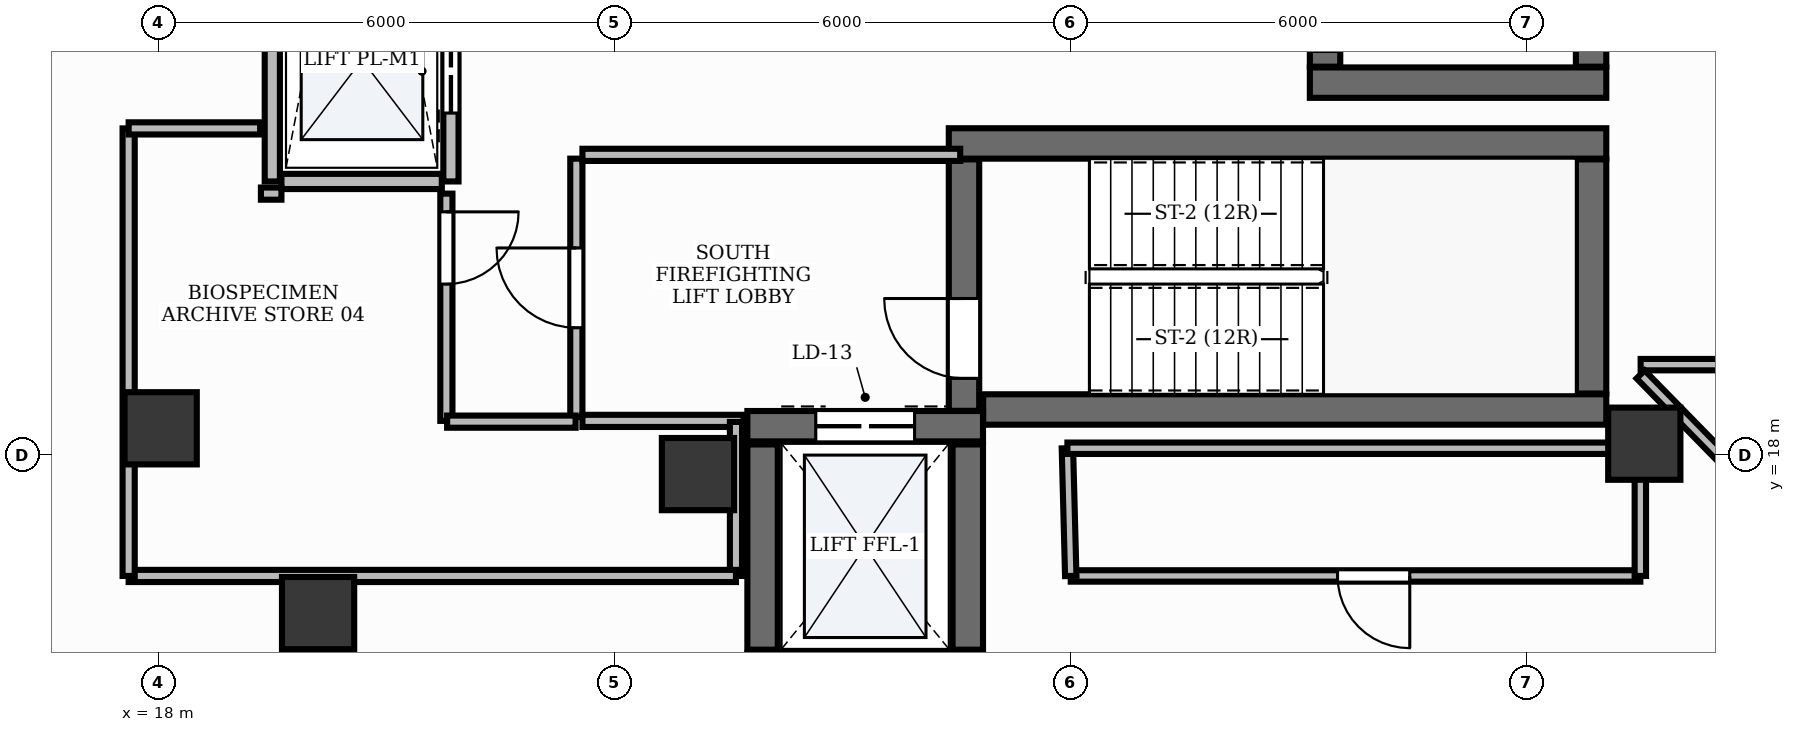
"""IFC4 building model, lengths in metres.
Left out: names, types, materials, properties, quantities, classifications, styles, units other than length and angle.
Written with IfcOpenShell. Run it as: python <this file> out.ifc"""

import sys

from ifc_helpers import new_model, si_unit, direction, frame, frame_2d, origin, origin_2d, place, context, subcontext, project, spatial, rectangle, extrude, element, fill, save


model = new_model("IFC4")
c1 = context("Model", 3, precision=1e-05, world=origin(), true_north=direction((0.0, 1.0)))
c2 = subcontext(c1, "Body", "Model", "MODEL_VIEW")
j1 = project(units=[si_unit("LENGTHUNIT", "METRE"), si_unit("PLANEANGLEUNIT", "RADIAN")], contexts=[c1])
p1 = place(None, origin())
s1 = spatial("IfcSite", under=j1, at=p1, CompositionType="ELEMENT")
p2 = place(p1, origin())
s2 = spatial("IfcBuilding", under=s1, at=p2, CompositionType="ELEMENT")
p3 = place(p2, frame((0.0, 0.0, 256.2)))
s3 = spatial("IfcBuildingStorey", under=s2, at=p3, CompositionType="ELEMENT", Elevation=256.2)
p4 = place(p3, frame((28.852, 18.6, 0.0), z_axis=(0.0, 0.0, 1.0), x_axis=(1.0, 0.0, 0.0)))
e1 = element("IfcWall", 1, at=p4, inside=s3, PredefinedType="SHEAR", context=c2, shape_type="SweptSolid", body=[
    extrude(rectangle(XDim=8.198, YDim=0.4, at=frame_2d((4.099, 0.0))), origin(), (0.0, 0.0, 1.0), 3.9),
])
p5 = place(p3, frame((28.4, 22.1, 0.0), z_axis=(0.0, 0.0, 1.0), x_axis=(1.0, 0.0, 0.0)))
e2 = element("IfcWall", 2, at=p5, inside=s3, PredefinedType="SHEAR", context=c2, shape_type="SweptSolid", body=[
    extrude(rectangle(XDim=8.65, YDim=0.4, at=frame_2d((4.325, 0.0))), origin(), (0.0, 0.0, 1.0), 3.9),
])
p6 = place(p3, frame((36.85, 18.81, 0.0), z_axis=(0.0, 0.0, 1.0), x_axis=(0.0, 1.0, 0.0)))
e3 = element("IfcWall", 3, at=p6, inside=s3, PredefinedType="SHEAR", context=c2, shape_type="SweptSolid", body=[
    extrude(rectangle(XDim=3.08, YDim=0.4, at=frame_2d((1.54, 0.0))), origin(), (0.0, 0.0, 1.0), 3.9),
])
p7 = place(p3, frame((28.6, 18.582, 0.0), z_axis=(0.0, 0.0, 1.0), x_axis=(0.0, 1.0, 0.0)))
e4 = element("IfcWall", 4, at=p7, inside=s3, PredefinedType="SHEAR", context=c2, shape_type="SweptSolid", body=[
    extrude(rectangle(XDim=3.308, YDim=0.4, at=frame_2d((1.654, 0.0))), origin(), (0.0, 0.0, 1.0), 3.9),
])
p8 = place(p7, frame((0.428, 0.0, 0.0)))
e5 = element("IfcOpeningElement", 5, at=p8, cuts=e4, PredefinedType="OPENING", context=c2, shape_type="SweptSolid", body=[
    extrude(rectangle(XDim=1.05, YDim=2.15, at=frame_2d((0.525, 1.075))), frame((0.0, 0.215, 0.0), z_axis=(0.0, -1.0, 0.0), x_axis=(1.0, 0.0, 0.0)), (0.0, 0.0, 1.0), 0.43),
])
p9 = place(p3, frame((33.15, 22.9, 0.0), z_axis=(0.0, 0.0, 1.0), x_axis=(1.0, 0.0, 0.0)))
e6 = element("IfcWall", 6, at=p9, inside=s3, PredefinedType="SHEAR", context=c2, shape_type="SweptSolid", body=[
    extrude(rectangle(XDim=3.9, YDim=0.4, at=frame_2d((1.95, 0.0))), origin(), (0.0, 0.0, 1.0), 3.9),
])
p10 = place(p3, frame((36.85, 23.11, 0.0), z_axis=(0.0, 0.0, 1.0), x_axis=(0.0, 1.0, 0.0)))
e7 = element("IfcWall", 7, at=p10, inside=s3, PredefinedType="SHEAR", context=c2, shape_type="SweptSolid", body=[
    extrude(rectangle(XDim=7.78, YDim=0.4, at=frame_2d((3.89, 0.0))), origin(), (0.0, 0.0, 1.0), 3.9),
])
p11 = place(p3, frame((33.35, 23.11, 0.0), z_axis=(0.0, 0.0, 1.0), x_axis=(0.0, 1.0, 0.0)))
e8 = element("IfcWall", 8, at=p11, inside=s3, PredefinedType="SHEAR", context=c2, shape_type="SweptSolid", body=[
    extrude(rectangle(XDim=7.78, YDim=0.4, at=frame_2d((3.89, 0.0))), origin(), (0.0, 0.0, 1.0), 3.9),
])
p12 = place(p11, frame((0.2, 0.0, 0.0)))
e9 = element("IfcOpeningElement", 9, at=p12, cuts=e8, PredefinedType="OPENING", context=c2, shape_type="SweptSolid", body=[
    extrude(rectangle(XDim=1.05, YDim=2.15, at=frame_2d((0.525, 1.075))), frame((0.0, 0.215, 0.0), z_axis=(0.0, -1.0, 0.0), x_axis=(1.0, 0.0, 0.0)), (0.0, 0.0, 1.0), 0.43),
])
p13 = place(p3, frame((25.75, 18.38, 0.0), z_axis=(0.0, 0.0, 1.0), x_axis=(1.0, 0.0, 0.0)))
e10 = element("IfcWall", 10, at=p13, inside=s3, PredefinedType="SHEAR", context=c2, shape_type="SweptSolid", body=[
    extrude(rectangle(XDim=3.1, YDim=0.4, at=frame_2d((1.55, 0.0))), origin(), (0.0, 0.0, 1.0), 3.9),
])
p14 = place(p13, frame((0.9, 0.0, 0.0)))
e11 = element("IfcOpeningElement", 11, at=p14, cuts=e10, PredefinedType="OPENING", context=c2, shape_type="SweptSolid", body=[
    extrude(rectangle(XDim=1.3, YDim=2.2, at=frame_2d((0.65, 1.1))), frame((0.0, 0.215, 0.0), z_axis=(0.0, -1.0, 0.0), x_axis=(1.0, 0.0, 0.0)), (0.0, 0.0, 1.0), 0.43),
])
for number, where, z_axis, x_axis in (
    (12, (25.95, 15.44, 0.0), (0.0, 0.0, 1.0), (0.0, 1.0, 0.0)),
    (13, (28.65, 15.44, 0.0), (0.0, 0.0, 1.0), (0.0, 1.0, 0.0)),
):
    element("IfcWall", number, at=place(p3, frame(where, z_axis=z_axis, x_axis=x_axis)), inside=s3, PredefinedType="SHEAR", context=c2, shape_type="SweptSolid", body=[
        extrude(rectangle(XDim=2.7, YDim=0.4, at=frame_2d((1.35, 0.0))), origin(), (0.0, 0.0, 1.0), 3.9),
    ])
for number, where, z_axis, x_axis in (
    (14, (25.1, 17.75, -0.0), (0.0, 0.0, 1.0), (1.0, 0.0, 0.0)),
    (15, (37.55, 18.15, -0.0), (0.0, 0.0, 1.0), (1.0, 0.0, 0.0)),
):
    element("IfcColumn", number, at=place(p3, frame(where, z_axis=z_axis, x_axis=x_axis)), inside=s3, PredefinedType="PILASTER", context=c2, shape_type="SweptSolid", body=[
        extrude(rectangle(XDim=0.95, YDim=0.95, at=origin_2d()), origin(), (0.0, 0.0, 1.0), 3.901),
    ])
for number, where, z_axis, x_axis in (
    (16, (18.031, 18.353, -0.0), (0.0, 0.0, 1.0), (1.0, 0.0, 0.0)),
    (17, (20.102, 15.921, -0.0), (0.0, 0.0, 1.0), (1.0, 0.0, 0.0)),
):
    element("IfcColumn", number, at=place(p3, frame(where, z_axis=z_axis, x_axis=x_axis)), inside=s3, PredefinedType="COLUMN", context=c2, shape_type="SweptSolid", body=[
        extrude(rectangle(XDim=0.95, YDim=0.95, at=origin_2d()), origin(), (0.0, 0.0, 1.0), 3.901),
    ])
p15 = place(p3, frame((19.5, 21.6, 0.0), z_axis=(0.0, 0.0, 1.0), x_axis=(0.0, 1.0, 0.0)))
e18 = element("IfcWall", 18, at=p15, inside=s3, PredefinedType="PARTITIONING", context=c2, shape_type="SweptSolid", body=[
    extrude(rectangle(XDim=10.8, YDim=0.2, at=frame_2d((5.4, 0.0))), origin(), (0.0, 0.0, 1.0), 2.22),
])
p16 = place(p3, frame((21.85, 21.6, 0.0), z_axis=(0.0, 0.0, 1.0), x_axis=(0.0, 1.0, 0.0)))
e19 = element("IfcWall", 19, at=p16, inside=s3, PredefinedType="PARTITIONING", context=c2, shape_type="SweptSolid", body=[
    extrude(rectangle(XDim=10.8, YDim=0.2, at=frame_2d((5.4, 0.0))), origin(), (0.0, 0.0, 1.0), 2.22),
])
p17 = place(p16, frame((0.9, 0.0, 0.0)))
e20 = element("IfcOpeningElement", 20, at=p17, cuts=e19, PredefinedType="OPENING", context=c2, shape_type="SweptSolid", body=[
    extrude(rectangle(XDim=1.1, YDim=2.2, at=frame_2d((0.55, 1.1))), frame((0.0, 0.115, 0.0), z_axis=(0.0, -1.0, 0.0), x_axis=(1.0, 0.0, 0.0)), (0.0, 0.0, 1.0), 0.23),
])
p18 = place(p16, frame((3.6, 0.0, 0.0)))
e21 = element("IfcOpeningElement", 21, at=p18, cuts=e19, PredefinedType="OPENING", context=c2, shape_type="SweptSolid", body=[
    extrude(rectangle(XDim=1.1, YDim=2.2, at=frame_2d((0.55, 1.1))), frame((0.0, 0.115, 0.0), z_axis=(0.0, -1.0, 0.0), x_axis=(1.0, 0.0, 0.0)), (0.0, 0.0, 1.0), 0.23),
])
p19 = place(p16, frame((6.3, 0.0, 0.0)))
e22 = element("IfcOpeningElement", 22, at=p19, cuts=e19, PredefinedType="OPENING", context=c2, shape_type="SweptSolid", body=[
    extrude(rectangle(XDim=1.1, YDim=2.2, at=frame_2d((0.55, 1.1))), frame((0.0, 0.115, 0.0), z_axis=(0.0, -1.0, 0.0), x_axis=(1.0, 0.0, 0.0)), (0.0, 0.0, 1.0), 0.23),
])
p20 = place(p16, frame((9.0, 0.0, 0.0)))
e23 = element("IfcOpeningElement", 23, at=p20, cuts=e19, PredefinedType="OPENING", context=c2, shape_type="SweptSolid", body=[
    extrude(rectangle(XDim=1.1, YDim=2.2, at=frame_2d((0.55, 1.1))), frame((0.0, 0.115, 0.0), z_axis=(0.0, -1.0, 0.0), x_axis=(1.0, 0.0, 0.0)), (0.0, 0.0, 1.0), 0.23),
])
p21 = place(p3, frame((19.62, 21.6, 0.0), z_axis=(0.0, 0.0, 1.0), x_axis=(1.0, 0.0, 0.0)))
e24 = element("IfcWall", 24, at=p21, inside=s3, PredefinedType="PARTITIONING", context=c2, shape_type="SweptSolid", body=[
    extrude(rectangle(XDim=2.11, YDim=0.2, at=frame_2d((1.055, 0.0))), origin(), (0.0, 0.0, 1.0), 2.22),
])
p22 = place(p3, frame((23.5, 18.5, 0.0), z_axis=(0.0, 0.0, 1.0), x_axis=(0.0, 1.0, 0.0)))
e25 = element("IfcWall", 25, at=p22, inside=s3, PredefinedType="PARTITIONING", context=c2, shape_type="SweptSolid", body=[
    extrude(rectangle(XDim=3.4, YDim=0.16, at=frame_2d((1.7, 0.0))), origin(), (0.0, 0.0, 1.0), 2.22),
])
p23 = place(p22, frame((1.175, 0.0, 0.0)))
e26 = element("IfcOpeningElement", 26, at=p23, cuts=e25, PredefinedType="OPENING", context=c2, shape_type="SweptSolid", body=[
    extrude(rectangle(XDim=1.05, YDim=2.15, at=frame_2d((0.525, 1.075))), frame((0.0, 0.095, 0.0), z_axis=(0.0, -1.0, 0.0), x_axis=(1.0, 0.0, 0.0)), (0.0, 0.0, 1.0), 0.19),
])
p24 = place(p3, frame((23.58, 21.95, 0.0), z_axis=(0.0, 0.0, 1.0), x_axis=(1.0, 0.0, 0.0)))
e27 = element("IfcWall", 27, at=p24, inside=s3, PredefinedType="PARTITIONING", context=c2, shape_type="SweptSolid", body=[
    extrude(rectangle(XDim=4.97, YDim=0.16, at=frame_2d((2.485, 0.0))), origin(), (0.0, 0.0, 1.0), 2.22),
])
p25 = place(p3, frame((23.58, 18.45, 0.0), z_axis=(0.0, 0.0, 1.0), x_axis=(1.0, 0.0, 0.0)))
e28 = element("IfcWall", 28, at=p25, inside=s3, PredefinedType="PARTITIONING", context=c2, shape_type="SweptSolid", body=[
    extrude(rectangle(XDim=2.12, YDim=0.16, at=frame_2d((1.06, 0.0))), origin(), (0.0, 0.0, 1.0), 2.22),
])
p26 = place(p3, frame((21.79, 21.44, 0.0), z_axis=(0.0, 0.0, 1.0), x_axis=(0.0, -1.0, 0.0)))
e29 = element("IfcWall", 29, at=p26, inside=s3, PredefinedType="PARTITIONING", context=c2, shape_type="SweptSolid", body=[
    extrude(rectangle(XDim=2.99, YDim=0.16, at=frame_2d((1.495, 0.0))), origin(), (0.0, 0.0, 1.0), 2.22),
])
p27 = place(p26, frame((0.24, 0.0, 0.0)))
e30 = element("IfcOpeningElement", 30, at=p27, cuts=e29, PredefinedType="OPENING", context=c2, shape_type="SweptSolid", body=[
    extrude(rectangle(XDim=0.95, YDim=2.15, at=frame_2d((0.475, 1.075))), frame((0.0, 0.095, 0.0), z_axis=(0.0, -1.0, 0.0), x_axis=(1.0, 0.0, 0.0)), (0.0, 0.0, 1.0), 0.19),
])
p28 = place(p3, frame((37.498, 16.41, 0.0), z_axis=(0.0, 0.0, 1.0), x_axis=(-1.0, 0.0, 0.0)))
e31 = element("IfcWall", 31, at=p28, inside=s3, PredefinedType="PARTITIONING", context=c2, shape_type="SweptSolid", body=[
    extrude(rectangle(XDim=7.494, YDim=0.15, at=frame_2d((3.747, 0.0))), origin(), (0.0, 0.0, 1.0), 2.22),
])
p29 = place(p28, frame((3.033, 0.0, 0.0)))
e32 = element("IfcOpeningElement", 32, at=p29, cuts=e31, PredefinedType="OPENING", context=c2, shape_type="SweptSolid", body=[
    extrude(rectangle(XDim=0.95, YDim=2.15, at=frame_2d((0.475, 1.075))), frame((0.0, 0.09, 0.0), z_axis=(0.0, -1.0, 0.0), x_axis=(1.0, 0.0, 0.0)), (0.0, 0.0, 1.0), 0.18),
])
p30 = place(p3, frame((37.502, 19.19, 0.0), z_axis=(0.0, 0.0, 1.0), x_axis=(1.0, 0.0, 0.0)))
e33 = element("IfcWall", 33, at=p30, inside=s3, PredefinedType="PARTITIONING", context=c2, shape_type="SweptSolid", body=[
    extrude(rectangle(XDim=2.622, YDim=0.15, at=frame_2d((1.311, 0.0))), origin(), (0.0, 0.0, 1.0), 2.22),
])
p31 = place(p30, frame((1.432, 0.0, 0.0)))
e34 = element("IfcOpeningElement", 34, at=p31, cuts=e33, PredefinedType="OPENING", context=c2, shape_type="SweptSolid", body=[
    extrude(rectangle(XDim=0.95, YDim=2.15, at=frame_2d((0.475, 1.075))), frame((0.0, 0.09, 0.0), z_axis=(0.0, -1.0, 0.0), x_axis=(1.0, 0.0, 0.0)), (0.0, 0.0, 1.0), 0.18),
])
p32 = place(p3, frame((19.35, 21.44, 0.0), z_axis=(0.0, 0.0, 1.0), x_axis=(1.0, 0.0, 0.0)))
e35 = element("IfcWall", 35, at=p32, inside=s3, PredefinedType="PARTITIONING", context=c2, shape_type="SweptSolid", body=[
    extrude(rectangle(XDim=0.27, YDim=0.16, at=frame_2d((0.135, 0.0))), origin(), (0.0, 0.0, 1.0), 2.22),
])
p33 = place(p3, frame((21.8, 18.44, 0.0), z_axis=(0.0, 0.0, 1.0), x_axis=(1.0, 0.0, 0.0)))
e36 = element("IfcWall", 36, at=p33, inside=s3, PredefinedType="PARTITIONING", context=c2, shape_type="SweptSolid", body=[
    extrude(rectangle(XDim=1.69, YDim=0.16, at=frame_2d((0.845, 0.0))), origin(), (0.0, 0.0, 1.0), 2.22),
])
p34 = place(p3, frame((25.6, 18.436, 0.0), z_axis=(0.0, 0.0, 1.0), x_axis=(0.0, -1.0, 0.0)))
e37 = element("IfcWall", 37, at=p34, inside=s3, PredefinedType="PARTITIONING", context=c2, shape_type="SweptSolid", body=[
    extrude(rectangle(XDim=2.026, YDim=0.16, at=frame_2d((1.013, 0.0))), origin(), (0.0, 0.0, 1.0), 2.22),
])
p35 = place(p3, frame((25.6, 16.41, 0.0), z_axis=(0.0, 0.0, 1.0), x_axis=(-1.0, 0.0, 0.0)))
e38 = element("IfcWall", 38, at=p35, inside=s3, PredefinedType="PARTITIONING", context=c2, shape_type="SweptSolid", body=[
    extrude(rectangle(XDim=7.99, YDim=0.16, at=frame_2d((3.995, 0.0))), origin(), (0.0, 0.0, 1.0), 2.22),
])
p36 = place(p3, frame((17.61, 16.41, 0.0), z_axis=(0.0, 0.0, 1.0), x_axis=(0.0, 1.0, 0.0)))
e39 = element("IfcWall", 39, at=p36, inside=s3, PredefinedType="PARTITIONING", context=c2, shape_type="SweptSolid", body=[
    extrude(rectangle(XDim=5.888, YDim=0.16, at=frame_2d((2.944, 0.0))), origin(), (0.0, 0.0, 1.0), 2.22),
])
p37 = place(p3, frame((17.61, 22.298, 0.0), z_axis=(0.0, 0.0, 1.0), x_axis=(1.0, 0.0, 0.0)))
e40 = element("IfcWall", 40, at=p37, inside=s3, PredefinedType="PARTITIONING", context=c2, shape_type="SweptSolid", body=[
    extrude(rectangle(XDim=1.73, YDim=0.16, at=frame_2d((0.865, 0.0))), origin(), (0.0, 0.0, 1.0), 2.22),
])
p38 = place(p3, frame((37.498, 18.364, 0.0), z_axis=(0.0, 0.0, 1.0), x_axis=(0.0, -1.0, 0.0)))
e41 = element("IfcWall", 41, at=p38, inside=s3, PredefinedType="PARTITIONING", context=c2, shape_type="SweptSolid", body=[
    extrude(rectangle(XDim=1.954, YDim=0.15, at=frame_2d((0.977, 0.0))), origin(), (0.0, 0.0, 1.0), 2.22),
])
p39 = place(p3, frame((30.004, 16.41, 0.0), z_axis=(0.0, 0.0, 1.0), x_axis=(-0.026146245732, 0.999658128479, 0.0)))
e42 = element("IfcWall", 42, at=p39, inside=s3, PredefinedType="PARTITIONING", context=c2, shape_type="SweptSolid", body=[
    extrude(rectangle(XDim=1.681, YDim=0.15, at=frame_2d((0.84, 0.0))), origin(), (0.0, 0.0, 1.0), 2.22),
])
p40 = place(p3, frame((29.96, 18.09, 0.0), z_axis=(0.0, 0.0, 1.0), x_axis=(1.0, 0.0, 0.0)))
e43 = element("IfcWall", 43, at=p40, inside=s3, PredefinedType="PARTITIONING", context=c2, shape_type="SweptSolid", body=[
    extrude(rectangle(XDim=7.39, YDim=0.15, at=frame_2d((3.695, 0.0))), origin(), (0.0, 0.0, 1.0), 2.22),
])
p41 = place(p3, frame((40.098, 16.41, 0.0), z_axis=(0.0, 0.0, 1.0), x_axis=(-0.69966677512, 0.714469316201, 0.0)))
e44 = element("IfcWall", 44, at=p41, inside=s3, PredefinedType="PARTITIONING", context=c2, shape_type="SweptSolid", body=[
    extrude(rectangle(XDim=3.711, YDim=0.15, at=frame_2d((1.855, 0.0))), origin(), (0.0, 0.0, 1.0), 2.22),
])
p42 = place(p8, origin())
e45 = element("IfcDoor", 45, at=p42, inside=s3, OperationType="SINGLE_SWING_RIGHT", PredefinedType="DOOR", context=c2, shape_type="SweptSolid", body=[
    extrude(rectangle(XDim=1.05, YDim=2.15, at=frame_2d((0.525, 1.075))), frame((0.0, 0.025, 0.0), z_axis=(0.0, -1.0, 0.0), x_axis=(1.0, 0.0, 0.0)), (0.0, 0.0, 1.0), 0.05),
])
fill(e5, e45)
p43 = place(p17, origin())
e46 = element("IfcDoor", 46, at=p43, inside=s3, OperationType="DOUBLE_DOOR_SLIDING", PredefinedType="DOOR", context=c2, shape_type="SweptSolid", body=[
    extrude(rectangle(XDim=1.1, YDim=2.2, at=frame_2d((0.55, 1.1))), frame((0.0, 0.025, 0.0), z_axis=(0.0, -1.0, 0.0), x_axis=(1.0, 0.0, 0.0)), (0.0, 0.0, 1.0), 0.05),
])
fill(e20, e46)
p44 = place(p14, origin())
e47 = element("IfcDoor", 47, at=p44, inside=s3, OperationType="DOUBLE_DOOR_SLIDING", PredefinedType="DOOR", context=c2, shape_type="SweptSolid", body=[
    extrude(rectangle(XDim=1.3, YDim=2.2, at=frame_2d((0.65, 1.1))), frame((0.0, 0.025, 0.0), z_axis=(0.0, -1.0, 0.0), x_axis=(1.0, 0.0, 0.0)), (0.0, 0.0, 1.0), 0.05),
])
fill(e11, e47)
p45 = place(p23, origin())
e48 = element("IfcDoor", 48, at=p45, inside=s3, OperationType="SINGLE_SWING_RIGHT", PredefinedType="DOOR", context=c2, shape_type="SweptSolid", body=[
    extrude(rectangle(XDim=1.05, YDim=2.15, at=frame_2d((0.525, 1.075))), frame((0.0, 0.025, 0.0), z_axis=(0.0, -1.0, 0.0), x_axis=(1.0, 0.0, 0.0)), (0.0, 0.0, 1.0), 0.05),
])
fill(e26, e48)
p46 = place(p27, origin())
e49 = element("IfcDoor", 49, at=p46, inside=s3, OperationType="SINGLE_SWING_LEFT", PredefinedType="DOOR", context=c2, shape_type="SweptSolid", body=[
    extrude(rectangle(XDim=0.95, YDim=2.15, at=frame_2d((0.475, 1.075))), frame((0.0, 0.025, 0.0), z_axis=(0.0, -1.0, 0.0), x_axis=(1.0, 0.0, 0.0)), (0.0, 0.0, 1.0), 0.05),
])
fill(e30, e49)
p47 = place(p29, origin())
e50 = element("IfcDoor", 50, at=p47, inside=s3, OperationType="SINGLE_SWING_LEFT", PredefinedType="DOOR", context=c2, shape_type="SweptSolid", body=[
    extrude(rectangle(XDim=0.95, YDim=2.15, at=frame_2d((0.475, 1.075))), frame((0.0, 0.025, 0.0), z_axis=(0.0, -1.0, 0.0), x_axis=(1.0, 0.0, 0.0)), (0.0, 0.0, 1.0), 0.05),
])
fill(e32, e50)
save(model, sys.argv[1])
